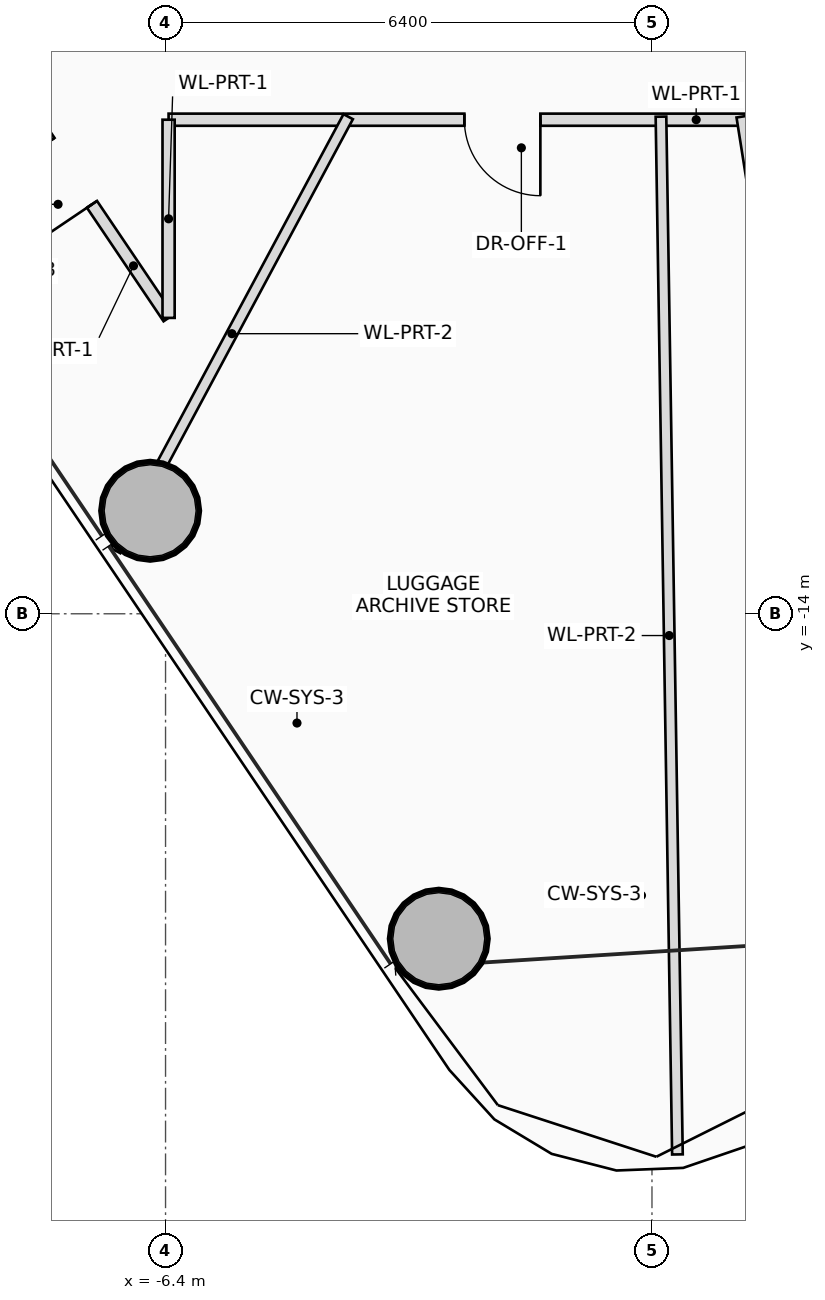
"""IFC4 building model, lengths in metres.
Left out: names, types, materials, properties, quantities, classifications, styles, units other than length and angle.
Written with IfcOpenShell. Run it as: python <this file> out.ifc"""

import sys

from ifc_helpers import new_model, si_unit, direction, frame, frame_2d, origin, origin_2d, place, context, subcontext, project, spatial, rectangle, hollow_circle, extrude, source, transform, mapped, element, fill, save


model = new_model("IFC4")
c1 = context("Model", 3, precision=1e-05, world=origin(), true_north=direction((0.0, 1.0)))
c2 = subcontext(c1, "Body", "Model", "MODEL_VIEW")
j1 = project(units=[si_unit("LENGTHUNIT", "METRE"), si_unit("PLANEANGLEUNIT", "RADIAN")], contexts=[c1])
p1 = place(None, origin())
s1 = spatial("IfcSite", under=j1, at=p1, CompositionType="ELEMENT")
p2 = place(p1, origin())
s2 = spatial("IfcBuilding", under=s1, at=p2, CompositionType="ELEMENT")
p3 = place(p2, frame((0.0, 0.0, 162.2)))
s3 = spatial("IfcBuildingStorey", under=s2, at=p3, CompositionType="ELEMENT", Elevation=162.2)
m1 = source(origin(), c2, "Body", "SweptSolid", [
    extrude(hollow_circle(Radius=0.65, WallThickness=0.045, at=origin_2d()), origin(), (0.0, 0.0, 1.0), 3.45),
])
for number, where, z_axis, x_axis in (
    (1, (-6.603, -12.645, 0.0), (0.0, 0.0, 1.0), (1.0, 0.0, 0.0)),
    (2, (-2.805, -18.275, 0.0), (0.0, 0.0, 1.0), (1.0, 0.0, 0.0)),
):
    element("IfcColumn", number, at=place(p3, frame(where, z_axis=z_axis, x_axis=x_axis)), inside=s3, PredefinedType="COLUMN", context=c2, shape_type="MappedRepresentation", body=[
        mapped(m1, transform((0.0, 0.0, 0.0), scale=1.0)),
    ])
p4 = place(p3, frame((-6.36, -10.107, 0.0), z_axis=(0.0, 0.0, 1.0), x_axis=(-0.559166202639, 0.829055581868, 0.0)))
e3 = element("IfcWall", 3, at=p4, inside=s3, PredefinedType="PARTITIONING", context=c2, shape_type="SweptSolid", body=[
    extrude(rectangle(XDim=3.022, YDim=0.16, at=frame_2d((1.511, 0.0))), origin(), (0.0, 0.0, 1.0), 2.605),
])
p5 = place(p4, frame((1.802, 0.0, 0.0)))
e4 = element("IfcOpeningElement", 4, at=p5, cuts=e3, PredefinedType="OPENING", context=c2, shape_type="SweptSolid", body=[
    extrude(rectangle(XDim=1.0, YDim=2.25, at=frame_2d((0.5, 1.125))), frame((0.0, 0.09, 0.0), z_axis=(0.0, -1.0, 0.0), x_axis=(1.0, 0.0, 0.0)), (0.0, 0.0, 1.0), 0.18),
])
p6 = place(p3, frame((5.25, -7.5, 0.0), z_axis=(0.0, 0.0, 1.0), x_axis=(-1.0, 0.0, 0.0)))
e5 = element("IfcWall", 5, at=p6, inside=s3, PredefinedType="PARTITIONING", context=c2, shape_type="SweptSolid", body=[
    extrude(rectangle(XDim=11.61, YDim=0.16, at=frame_2d((5.805, 0.0))), origin(), (0.0, 0.0, 1.0), 2.605),
])
p7 = place(p6, frame((1.618, 0.0, 0.0)))
e6 = element("IfcOpeningElement", 6, at=p7, cuts=e5, PredefinedType="OPENING", context=c2, shape_type="SweptSolid", body=[
    extrude(rectangle(XDim=1.0, YDim=2.25, at=frame_2d((0.5, 1.125))), frame((0.0, 0.09, 0.0), z_axis=(0.0, -1.0, 0.0), x_axis=(1.0, 0.0, 0.0)), (0.0, 0.0, 1.0), 0.18),
])
p8 = place(p6, frame((6.719, 0.0, 0.0)))
e7 = element("IfcOpeningElement", 7, at=p8, cuts=e5, PredefinedType="OPENING", context=c2, shape_type="SweptSolid", body=[
    extrude(rectangle(XDim=1.0, YDim=2.25, at=frame_2d((0.5, 1.125))), frame((0.0, 0.09, 0.0), z_axis=(0.0, -1.0, 0.0), x_axis=(1.0, 0.0, 0.0)), (0.0, 0.0, 1.0), 0.18),
])
p9 = place(p3, frame((-6.36, -7.5, 0.0), z_axis=(0.0, 0.0, 1.0), x_axis=(0.0, -1.0, 0.0)))
e8 = element("IfcWall", 8, at=p9, inside=s3, PredefinedType="PARTITIONING", context=c2, shape_type="SweptSolid", body=[
    extrude(rectangle(XDim=2.607, YDim=0.16, at=frame_2d((1.304, 0.0))), origin(), (0.0, 0.0, 1.0), 2.605),
])
p10 = place(p3, frame((-3.997, -7.46, 0.0), z_axis=(0.0, 0.0, 1.0), x_axis=(-0.472255924341, -0.881461480681, 0.0)))
e9 = element("IfcWall", 9, at=p10, inside=s3, PredefinedType="PARTITIONING", context=c2, shape_type="SweptSolid", body=[
    extrude(rectangle(XDim=6.478, YDim=0.14, at=frame_2d((3.239, 0.0))), origin(), (0.0, 0.0, 1.0), 2.605),
])
p11 = place(p3, frame((0.118, -7.46, 0.0), z_axis=(0.0, 0.0, 1.0), x_axis=(0.015859383496, -0.999874232069, 0.0)))
e10 = element("IfcWall", 10, at=p11, inside=s3, PredefinedType="PARTITIONING", context=c2, shape_type="SweptSolid", body=[
    extrude(rectangle(XDim=13.655, YDim=0.14, at=frame_2d((6.827, 0.0))), origin(), (0.0, 0.0, 1.0), 2.765),
])
p12 = place(p3, frame((1.181, -7.46, 0.0), z_axis=(0.0, 0.0, 1.0), x_axis=(0.156458885844, -0.98768447241, 0.0)))
e11 = element("IfcWall", 11, at=p12, inside=s3, PredefinedType="PARTITIONING", context=c2, shape_type="SweptSolid", body=[
    extrude(rectangle(XDim=11.316, YDim=0.14, at=frame_2d((5.658, 0.0))), origin(), (0.0, 0.0, 1.0), 2.605),
])
p13 = place(p5, origin())
e12 = element("IfcDoor", 12, at=p13, inside=s3, OperationType="SINGLE_SWING_LEFT", PredefinedType="DOOR", context=c2, shape_type="SweptSolid", body=[
    extrude(rectangle(XDim=1.0, YDim=2.25, at=frame_2d((0.5, 1.125))), frame((0.0, 0.025, 0.0), z_axis=(0.0, -1.0, 0.0), x_axis=(1.0, 0.0, 0.0)), (0.0, 0.0, 1.0), 0.05),
])
fill(e4, e12)
p14 = place(p8, origin())
e13 = element("IfcDoor", 13, at=p14, inside=s3, OperationType="SINGLE_SWING_LEFT", PredefinedType="DOOR", context=c2, shape_type="SweptSolid", body=[
    extrude(rectangle(XDim=1.0, YDim=2.25, at=frame_2d((0.5, 1.125))), frame((0.0, 0.025, 0.0), z_axis=(0.0, -1.0, 0.0), x_axis=(1.0, 0.0, 0.0)), (0.0, 0.0, 1.0), 0.05),
])
fill(e7, e13)
save(model, sys.argv[1])
